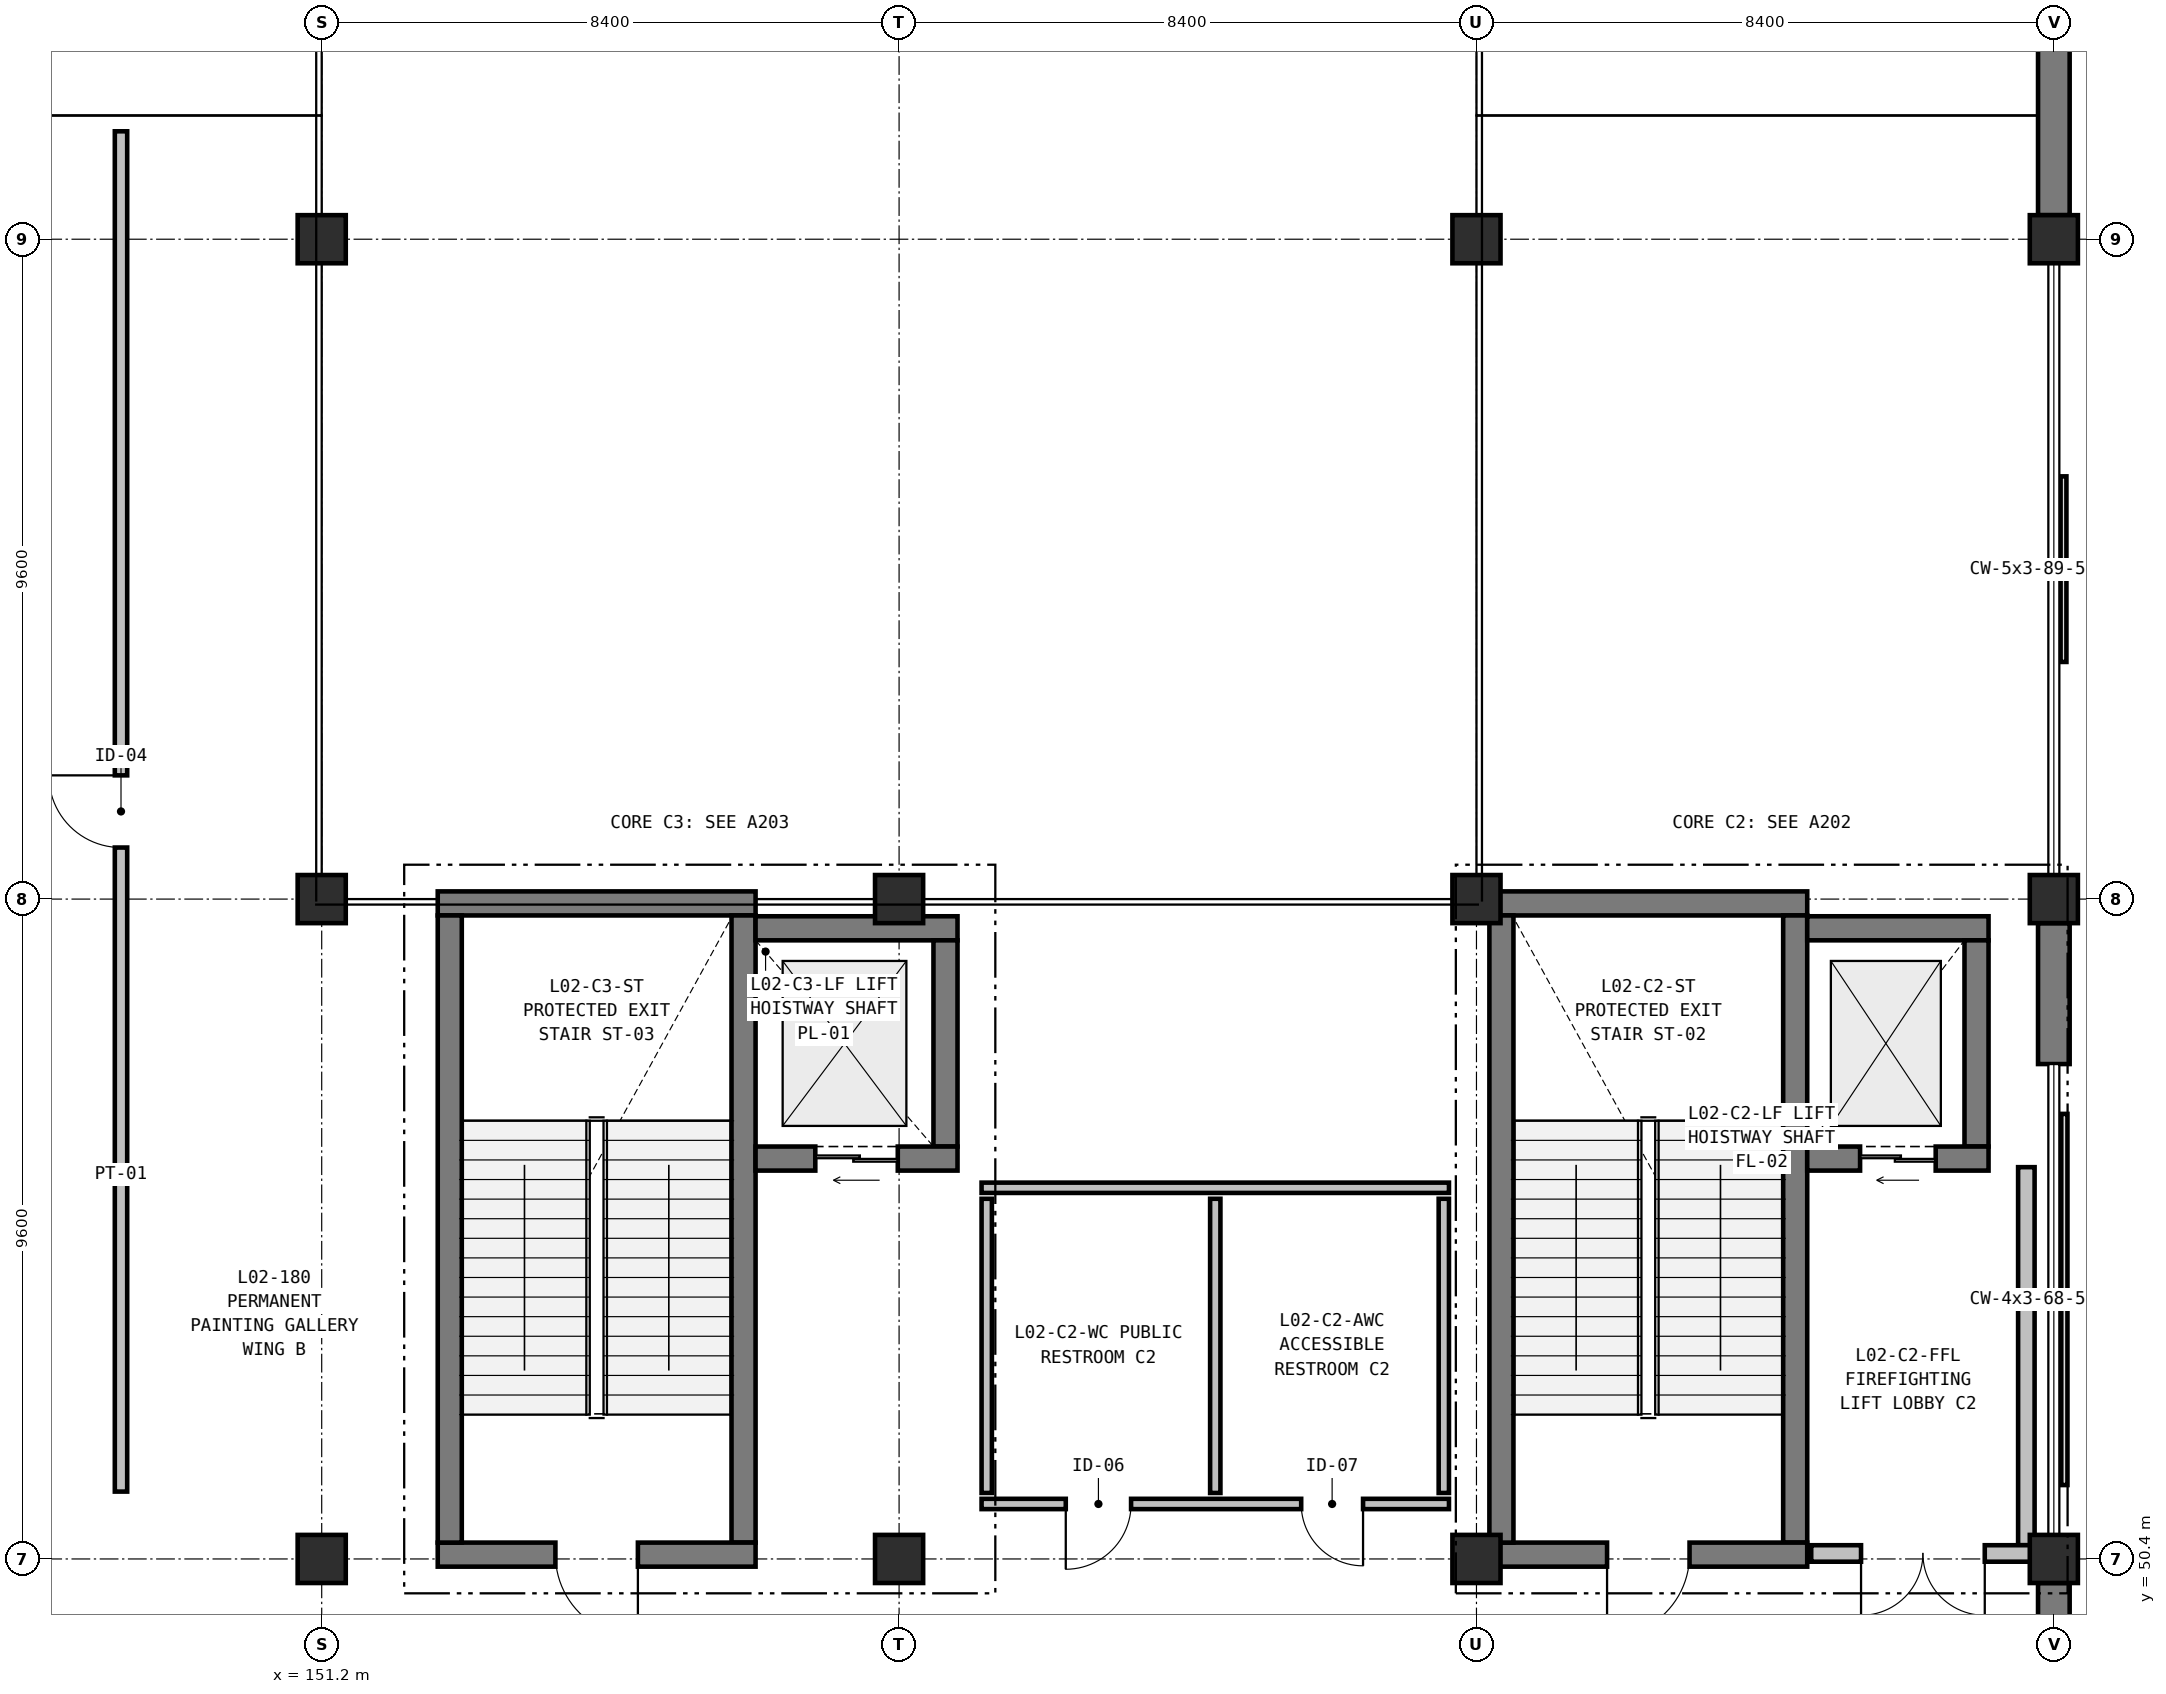
"""IFC4 building model, lengths in metres.
Left out: names, types, materials, properties, quantities, classifications, styles, units other than length and angle.
Written with IfcOpenShell. Run it as: python <this file> out.ifc"""

import sys

from ifc_helpers import new_model, si_unit, direction, frame, frame_2d, origin, origin_2d, place, context, subcontext, project, spatial, rectangle, extrude, element, fill, save


model = new_model("IFC4")
c1 = context("Model", 3, precision=1e-05, world=origin(), true_north=direction((0.0, 1.0)))
c2 = subcontext(c1, "Body", "Model", "MODEL_VIEW")
j1 = project(units=[si_unit("LENGTHUNIT", "METRE"), si_unit("PLANEANGLEUNIT", "RADIAN")], contexts=[c1])
p1 = place(None, origin())
s1 = spatial("IfcSite", under=j1, at=p1, CompositionType="ELEMENT")
p2 = place(p1, origin())
s2 = spatial("IfcBuilding", under=s1, at=p2, CompositionType="ELEMENT")
p3 = place(p2, frame((0.0, 0.0, 11.4)))
s3 = spatial("IfcBuildingStorey", under=s2, at=p3, CompositionType="ELEMENT", Elevation=11.4)
for number, where, z_axis, x_axis in (
    (1, (151.2, 50.4, 0.0), (0.0, 0.0, 1.0), (1.0, 0.0, 0.0)),
    (2, (151.2, 60.0, 0.0), (0.0, 0.0, 1.0), (1.0, 0.0, 0.0)),
    (3, (151.2, 69.6, 0.0), (0.0, 0.0, 1.0), (1.0, 0.0, 0.0)),
    (4, (159.6, 50.4, 0.0), (0.0, 0.0, 1.0), (1.0, 0.0, 0.0)),
    (5, (159.6, 60.0, 0.0), (0.0, 0.0, 1.0), (1.0, 0.0, 0.0)),
    (6, (168.0, 50.4, 0.0), (0.0, 0.0, 1.0), (1.0, 0.0, 0.0)),
    (7, (168.0, 60.0, 0.0), (0.0, 0.0, 1.0), (1.0, 0.0, 0.0)),
    (8, (168.0, 69.6, 0.0), (0.0, 0.0, 1.0), (1.0, 0.0, 0.0)),
    (9, (176.4, 50.4, 0.0), (0.0, 0.0, 1.0), (1.0, 0.0, 0.0)),
    (10, (176.4, 60.0, 0.0), (0.0, 0.0, 1.0), (1.0, 0.0, 0.0)),
    (11, (176.4, 69.6, 0.0), (0.0, 0.0, 1.0), (1.0, 0.0, 0.0)),
):
    element("IfcColumn", number, at=place(p3, frame(where, z_axis=z_axis, x_axis=x_axis)), inside=s3, PredefinedType="COLUMN", context=c2, shape_type="SweptSolid", body=[
        extrude(rectangle(XDim=0.7, YDim=0.7, at=origin_2d()), origin(), (0.0, 0.0, 1.0), 5.4),
    ])
p4 = place(p3, frame((176.4, 78.85, 0.0), z_axis=(0.0, 0.0, 1.0), x_axis=(0.0, -1.0, 0.0)))
e12 = element("IfcWall", 12, at=p4, inside=s3, PredefinedType="SOLIDWALL", context=c2, shape_type="SweptSolid", body=[
    extrude(rectangle(XDim=8.9, YDim=0.46, at=frame_2d((4.45, 0.0))), origin(), (0.0, 0.0, 1.0), 5.1),
])
p5 = place(p4, frame((3.85, 0.0, 0.9)))
e13 = element("IfcOpeningElement", 13, at=p5, cuts=e12, PredefinedType="OPENING", context=c2, shape_type="SweptSolid", body=[
    extrude(rectangle(XDim=1.2, YDim=2.1, at=frame_2d((0.6, 1.05))), frame((0.0, 0.24, 0.0), z_axis=(0.0, -1.0, 0.0), x_axis=(1.0, 0.0, 0.0)), (0.0, 0.0, 1.0), 0.48),
])
p6 = place(p3, frame((176.4, 59.65, 0.0), z_axis=(0.0, 0.0, 1.0), x_axis=(0.0, -1.0, 0.0)))
e14 = element("IfcWall", 14, at=p6, inside=s3, PredefinedType="SOLIDWALL", context=c2, shape_type="SweptSolid", body=[
    extrude(rectangle(XDim=2.05, YDim=0.46, at=frame_2d((1.025, 0.0))), origin(), (0.0, 0.0, 1.0), 5.1),
])
p7 = place(p3, frame((176.4, 50.05, 0.0), z_axis=(0.0, 0.0, 1.0), x_axis=(0.0, -1.0, 0.0)))
e15 = element("IfcWall", 15, at=p7, inside=s3, PredefinedType="SOLIDWALL", context=c2, shape_type="SweptSolid", body=[
    extrude(rectangle(XDim=4.1, YDim=0.46, at=frame_2d((2.05, 0.0))), origin(), (0.0, 0.0, 1.0), 5.1),
])
p8 = place(p3, frame((168.188, 59.937, 0.0), z_axis=(0.0, 0.0, 1.0), x_axis=(1.0, 0.0, 0.0)))
e16 = element("IfcWall", 16, at=p8, inside=s3, PredefinedType="SHEAR", context=c2, shape_type="SweptSolid", body=[
    extrude(rectangle(XDim=4.624, YDim=0.35, at=frame_2d((2.312, 0.0))), origin(), (0.0, 0.0, 1.0), 5.1),
])
p9 = place(p3, frame((172.637, 59.762, 0.0), z_axis=(0.0, 0.0, 1.0), x_axis=(0.0, -1.0, 0.0)))
e17 = element("IfcWall", 17, at=p9, inside=s3, PredefinedType="SHEAR", context=c2, shape_type="SweptSolid", body=[
    extrude(rectangle(XDim=9.124, YDim=0.35, at=frame_2d((4.562, 0.0))), origin(), (0.0, 0.0, 1.0), 5.1),
])
p10 = place(p3, frame((172.812, 50.463, 0.0), z_axis=(0.0, 0.0, 1.0), x_axis=(-1.0, 0.0, 0.0)))
e18 = element("IfcWall", 18, at=p10, inside=s3, PredefinedType="SHEAR", context=c2, shape_type="SweptSolid", body=[
    extrude(rectangle(XDim=4.624, YDim=0.35, at=frame_2d((2.312, 0.0))), origin(), (0.0, 0.0, 1.0), 5.1),
])
p11 = place(p10, frame((1.712, 0.0, 0.0)))
e19 = element("IfcOpeningElement", 19, at=p11, cuts=e18, PredefinedType="OPENING", context=c2, shape_type="SweptSolid", body=[
    extrude(rectangle(XDim=1.2, YDim=2.2, at=frame_2d((0.6, 1.1))), frame((0.0, 0.185, 0.0), z_axis=(0.0, -1.0, 0.0), x_axis=(1.0, 0.0, 0.0)), (0.0, 0.0, 1.0), 0.37),
])
p12 = place(p3, frame((168.363, 50.638, 0.0), z_axis=(0.0, 0.0, 1.0), x_axis=(0.0, 1.0, 0.0)))
e20 = element("IfcWall", 20, at=p12, inside=s3, PredefinedType="SHEAR", context=c2, shape_type="SweptSolid", body=[
    extrude(rectangle(XDim=9.124, YDim=0.35, at=frame_2d((4.562, 0.0))), origin(), (0.0, 0.0, 1.0), 5.1),
])
p13 = place(p3, frame((172.812, 59.575, 0.0), z_axis=(0.0, 0.0, 1.0), x_axis=(1.0, 0.0, 0.0)))
e21 = element("IfcWall", 21, at=p13, inside=s3, PredefinedType="SHEAR", context=c2, shape_type="SweptSolid", body=[
    extrude(rectangle(XDim=2.638, YDim=0.35, at=frame_2d((1.319, 0.0))), origin(), (0.0, 0.0, 1.0), 5.1),
])
p14 = place(p3, frame((175.275, 59.4, 0.0), z_axis=(0.0, 0.0, 1.0), x_axis=(0.0, -1.0, 0.0)))
e22 = element("IfcWall", 22, at=p14, inside=s3, PredefinedType="SHEAR", context=c2, shape_type="SweptSolid", body=[
    extrude(rectangle(XDim=3.0, YDim=0.35, at=frame_2d((1.5, 0.0))), origin(), (0.0, 0.0, 1.0), 5.1),
])
p15 = place(p3, frame((175.45, 56.225, 0.0), z_axis=(0.0, 0.0, 1.0), x_axis=(-1.0, 0.0, 0.0)))
e23 = element("IfcWall", 23, at=p15, inside=s3, PredefinedType="SHEAR", context=c2, shape_type="SweptSolid", body=[
    extrude(rectangle(XDim=2.638, YDim=0.35, at=frame_2d((1.319, 0.0))), origin(), (0.0, 0.0, 1.0), 5.1),
])
p16 = place(p15, frame((0.769, 0.0, 0.0)))
e24 = element("IfcOpeningElement", 24, at=p16, cuts=e23, PredefinedType="OPENING", context=c2, shape_type="SweptSolid", body=[
    extrude(rectangle(XDim=1.1, YDim=2.2, at=frame_2d((0.55, 1.1))), frame((0.0, 0.185, 0.0), z_axis=(0.0, -1.0, 0.0), x_axis=(1.0, 0.0, 0.0)), (0.0, 0.0, 1.0), 0.37),
])
p17 = place(p3, frame((176.0, 56.1, 0.0), z_axis=(0.0, 0.0, 1.0), x_axis=(0.0, -1.0, 0.0)))
e25 = element("IfcWall", 25, at=p17, inside=s3, PredefinedType="PARTITIONING", context=c2, shape_type="SweptSolid", body=[
    extrude(rectangle(XDim=5.5, YDim=0.24, at=frame_2d((2.75, 0.0))), origin(), (0.0, 0.0, 1.0), 4.425),
])
p18 = place(p3, frame((176.12, 50.48, 0.0), z_axis=(0.0, 0.0, 1.0), x_axis=(-1.0, 0.0, 0.0)))
e26 = element("IfcWall", 26, at=p18, inside=s3, PredefinedType="PARTITIONING", context=c2, shape_type="SweptSolid", body=[
    extrude(rectangle(XDim=3.25, YDim=0.24, at=frame_2d((1.625, 0.0))), origin(), (0.0, 0.0, 1.0), 4.425),
])
p19 = place(p18, frame((0.725, 0.0, 0.0)))
e27 = element("IfcOpeningElement", 27, at=p19, cuts=e26, PredefinedType="OPENING", context=c2, shape_type="SweptSolid", body=[
    extrude(rectangle(XDim=1.8, YDim=2.25, at=frame_2d((0.9, 1.125))), frame((0.0, 0.13, 0.0), z_axis=(0.0, -1.0, 0.0), x_axis=(1.0, 0.0, 0.0)), (0.0, 0.0, 1.0), 0.26),
])
p20 = place(p3, frame((167.6, 51.2, 0.0), z_axis=(0.0, 0.0, 1.0), x_axis=(-1.0, 0.0, 0.0)))
e28 = element("IfcWall", 28, at=p20, inside=s3, PredefinedType="PARTITIONING", context=c2, shape_type="SweptSolid", body=[
    extrude(rectangle(XDim=6.8, YDim=0.15, at=frame_2d((3.4, 0.0))), origin(), (0.0, 0.0, 1.0), 5.1),
])
p21 = place(p20, frame((1.25, 0.0, 0.0)))
e29 = element("IfcOpeningElement", 29, at=p21, cuts=e28, PredefinedType="OPENING", context=c2, shape_type="SweptSolid", body=[
    extrude(rectangle(XDim=0.9, YDim=2.1, at=frame_2d((0.45, 1.05))), frame((0.0, 0.085, 0.0), z_axis=(0.0, -1.0, 0.0), x_axis=(1.0, 0.0, 0.0)), (0.0, 0.0, 1.0), 0.17),
])
p22 = place(p20, frame((4.625, 0.0, 0.0)))
e30 = element("IfcOpeningElement", 30, at=p22, cuts=e28, PredefinedType="OPENING", context=c2, shape_type="SweptSolid", body=[
    extrude(rectangle(XDim=0.95, YDim=2.15, at=frame_2d((0.475, 1.075))), frame((0.0, 0.085, 0.0), z_axis=(0.0, -1.0, 0.0), x_axis=(1.0, 0.0, 0.0)), (0.0, 0.0, 1.0), 0.17),
])
p23 = place(p3, frame((160.8, 55.8, 0.0), z_axis=(0.0, 0.0, 1.0), x_axis=(1.0, 0.0, 0.0)))
e31 = element("IfcWall", 31, at=p23, inside=s3, PredefinedType="PARTITIONING", context=c2, shape_type="SweptSolid", body=[
    extrude(rectangle(XDim=6.8, YDim=0.15, at=frame_2d((3.4, 0.0))), origin(), (0.0, 0.0, 1.0), 5.1),
])
for number, where, z_axis, x_axis in (
    (32, (160.875, 51.36, 0.0), (0.0, 0.0, 1.0), (0.0, 1.0, 0.0)),
    (33, (164.2, 51.36, 0.0), (0.0, 0.0, 1.0), (0.0, 1.0, 0.0)),
    (34, (167.525, 51.36, 0.0), (0.0, 0.0, 1.0), (0.0, 1.0, 0.0)),
):
    element("IfcWall", number, at=place(p3, frame(where, z_axis=z_axis, x_axis=x_axis)), inside=s3, PredefinedType="PARTITIONING", context=c2, shape_type="SweptSolid", body=[
        extrude(rectangle(XDim=4.28, YDim=0.15, at=frame_2d((2.14, 0.0))), origin(), (0.0, 0.0, 1.0), 5.1),
    ])
p24 = place(p3, frame((152.888, 59.937, 0.0), z_axis=(0.0, 0.0, 1.0), x_axis=(1.0, 0.0, 0.0)))
e35 = element("IfcWall", 35, at=p24, inside=s3, PredefinedType="SHEAR", context=c2, shape_type="SweptSolid", body=[
    extrude(rectangle(XDim=4.624, YDim=0.35, at=frame_2d((2.312, 0.0))), origin(), (0.0, 0.0, 1.0), 5.1),
])
p25 = place(p3, frame((157.337, 59.762, 0.0), z_axis=(0.0, 0.0, 1.0), x_axis=(0.0, -1.0, 0.0)))
e36 = element("IfcWall", 36, at=p25, inside=s3, PredefinedType="SHEAR", context=c2, shape_type="SweptSolid", body=[
    extrude(rectangle(XDim=9.124, YDim=0.35, at=frame_2d((4.562, 0.0))), origin(), (0.0, 0.0, 1.0), 5.1),
])
p26 = place(p3, frame((157.512, 50.463, 0.0), z_axis=(0.0, 0.0, 1.0), x_axis=(-1.0, 0.0, 0.0)))
e37 = element("IfcWall", 37, at=p26, inside=s3, PredefinedType="SHEAR", context=c2, shape_type="SweptSolid", body=[
    extrude(rectangle(XDim=4.624, YDim=0.35, at=frame_2d((2.312, 0.0))), origin(), (0.0, 0.0, 1.0), 5.1),
])
p27 = place(p26, frame((1.712, 0.0, 0.0)))
e38 = element("IfcOpeningElement", 38, at=p27, cuts=e37, PredefinedType="OPENING", context=c2, shape_type="SweptSolid", body=[
    extrude(rectangle(XDim=1.2, YDim=2.2, at=frame_2d((0.6, 1.1))), frame((0.0, 0.185, 0.0), z_axis=(0.0, -1.0, 0.0), x_axis=(1.0, 0.0, 0.0)), (0.0, 0.0, 1.0), 0.37),
])
p28 = place(p3, frame((153.063, 50.638, 0.0), z_axis=(0.0, 0.0, 1.0), x_axis=(0.0, 1.0, 0.0)))
e39 = element("IfcWall", 39, at=p28, inside=s3, PredefinedType="SHEAR", context=c2, shape_type="SweptSolid", body=[
    extrude(rectangle(XDim=9.124, YDim=0.35, at=frame_2d((4.562, 0.0))), origin(), (0.0, 0.0, 1.0), 5.1),
])
p29 = place(p3, frame((157.512, 59.575, 0.0), z_axis=(0.0, 0.0, 1.0), x_axis=(1.0, 0.0, 0.0)))
e40 = element("IfcWall", 40, at=p29, inside=s3, PredefinedType="SHEAR", context=c2, shape_type="SweptSolid", body=[
    extrude(rectangle(XDim=2.938, YDim=0.35, at=frame_2d((1.469, 0.0))), origin(), (0.0, 0.0, 1.0), 5.1),
])
p30 = place(p3, frame((160.275, 59.4, 0.0), z_axis=(0.0, 0.0, 1.0), x_axis=(0.0, -1.0, 0.0)))
e41 = element("IfcWall", 41, at=p30, inside=s3, PredefinedType="SHEAR", context=c2, shape_type="SweptSolid", body=[
    extrude(rectangle(XDim=3.0, YDim=0.35, at=frame_2d((1.5, 0.0))), origin(), (0.0, 0.0, 1.0), 5.1),
])
p31 = place(p3, frame((160.45, 56.225, 0.0), z_axis=(0.0, 0.0, 1.0), x_axis=(-1.0, 0.0, 0.0)))
e42 = element("IfcWall", 42, at=p31, inside=s3, PredefinedType="SHEAR", context=c2, shape_type="SweptSolid", body=[
    extrude(rectangle(XDim=2.938, YDim=0.35, at=frame_2d((1.469, 0.0))), origin(), (0.0, 0.0, 1.0), 5.1),
])
p32 = place(p31, frame((0.869, 0.0, 0.0)))
e43 = element("IfcOpeningElement", 43, at=p32, cuts=e42, PredefinedType="OPENING", context=c2, shape_type="SweptSolid", body=[
    extrude(rectangle(XDim=1.2, YDim=2.2, at=frame_2d((0.6, 1.1))), frame((0.0, 0.185, 0.0), z_axis=(0.0, -1.0, 0.0), x_axis=(1.0, 0.0, 0.0)), (0.0, 0.0, 1.0), 0.37),
])
p33 = place(p3, frame((148.28, 51.38, 0.0), z_axis=(0.0, 0.0, 1.0), x_axis=(0.0, 1.0, 0.0)))
e44 = element("IfcWall", 44, at=p33, inside=s3, PredefinedType="PARTITIONING", context=c2, shape_type="SweptSolid", body=[
    extrude(rectangle(XDim=19.79, YDim=0.18, at=frame_2d((9.895, 0.0))), origin(), (0.0, 0.0, 1.0), 4.425),
])
p34 = place(p33, frame((9.37, 0.0, 0.0)))
e45 = element("IfcOpeningElement", 45, at=p34, cuts=e44, PredefinedType="OPENING", context=c2, shape_type="SweptSolid", body=[
    extrude(rectangle(XDim=1.05, YDim=2.2, at=frame_2d((0.525, 1.1))), frame((0.0, 0.1, 0.0), z_axis=(0.0, -1.0, 0.0), x_axis=(1.0, 0.0, 0.0)), (0.0, 0.0, 1.0), 0.2),
])
p35 = place(p11, origin())
e46 = element("IfcDoor", 46, at=p35, inside=s3, OperationType="SINGLE_SWING_RIGHT", PredefinedType="DOOR", context=c2, shape_type="SweptSolid", body=[
    extrude(rectangle(XDim=1.2, YDim=2.2, at=frame_2d((0.6, 1.1))), frame((0.0, 0.025, 0.0), z_axis=(0.0, -1.0, 0.0), x_axis=(1.0, 0.0, 0.0)), (0.0, 0.0, 1.0), 0.05),
])
fill(e19, e46)
p36 = place(p16, origin())
e47 = element("IfcDoor", 47, at=p36, inside=s3, OperationType="DOUBLE_DOOR_SLIDING", PredefinedType="DOOR", context=c2, shape_type="SweptSolid", body=[
    extrude(rectangle(XDim=1.1, YDim=2.2, at=frame_2d((0.55, 1.1))), frame((0.0, 0.025, 0.0), z_axis=(0.0, -1.0, 0.0), x_axis=(1.0, 0.0, 0.0)), (0.0, 0.0, 1.0), 0.05),
])
fill(e24, e47)
p37 = place(p19, origin())
e48 = element("IfcDoor", 48, at=p37, inside=s3, OperationType="DOUBLE_DOOR_SINGLE_SWING", PredefinedType="DOOR", context=c2, shape_type="SweptSolid", body=[
    extrude(rectangle(XDim=1.8, YDim=2.25, at=frame_2d((0.9, 1.125))), frame((0.0, 0.025, 0.0), z_axis=(0.0, -1.0, 0.0), x_axis=(1.0, 0.0, 0.0)), (0.0, 0.0, 1.0), 0.05),
])
fill(e27, e48)
p38 = place(p21, origin())
e49 = element("IfcDoor", 49, at=p38, inside=s3, OperationType="SINGLE_SWING_LEFT", PredefinedType="DOOR", context=c2, shape_type="SweptSolid", body=[
    extrude(rectangle(XDim=0.9, YDim=2.1, at=frame_2d((0.45, 1.05))), frame((0.0, 0.025, 0.0), z_axis=(0.0, -1.0, 0.0), x_axis=(1.0, 0.0, 0.0)), (0.0, 0.0, 1.0), 0.05),
])
fill(e29, e49)
p39 = place(p22, origin())
e50 = element("IfcDoor", 50, at=p39, inside=s3, OperationType="SINGLE_SWING_RIGHT", PredefinedType="DOOR", context=c2, shape_type="SweptSolid", body=[
    extrude(rectangle(XDim=0.95, YDim=2.15, at=frame_2d((0.475, 1.075))), frame((0.0, 0.025, 0.0), z_axis=(0.0, -1.0, 0.0), x_axis=(1.0, 0.0, 0.0)), (0.0, 0.0, 1.0), 0.05),
])
fill(e30, e50)
p40 = place(p27, origin())
e51 = element("IfcDoor", 51, at=p40, inside=s3, OperationType="SINGLE_SWING_LEFT", PredefinedType="DOOR", context=c2, shape_type="SweptSolid", body=[
    extrude(rectangle(XDim=1.2, YDim=2.2, at=frame_2d((0.6, 1.1))), frame((0.0, 0.025, 0.0), z_axis=(0.0, -1.0, 0.0), x_axis=(1.0, 0.0, 0.0)), (0.0, 0.0, 1.0), 0.05),
])
fill(e38, e51)
p41 = place(p32, origin())
e52 = element("IfcDoor", 52, at=p41, inside=s3, OperationType="DOUBLE_DOOR_SLIDING", PredefinedType="DOOR", context=c2, shape_type="SweptSolid", body=[
    extrude(rectangle(XDim=1.2, YDim=2.2, at=frame_2d((0.6, 1.1))), frame((0.0, 0.025, 0.0), z_axis=(0.0, -1.0, 0.0), x_axis=(1.0, 0.0, 0.0)), (0.0, 0.0, 1.0), 0.05),
])
fill(e43, e52)
p42 = place(p34, origin())
e53 = element("IfcDoor", 53, at=p42, inside=s3, OperationType="SINGLE_SWING_RIGHT", PredefinedType="DOOR", context=c2, shape_type="SweptSolid", body=[
    extrude(rectangle(XDim=1.05, YDim=2.2, at=frame_2d((0.525, 1.1))), frame((0.0, 0.025, 0.0), z_axis=(0.0, -1.0, 0.0), x_axis=(1.0, 0.0, 0.0)), (0.0, 0.0, 1.0), 0.05),
])
fill(e45, e53)
save(model, sys.argv[1])
